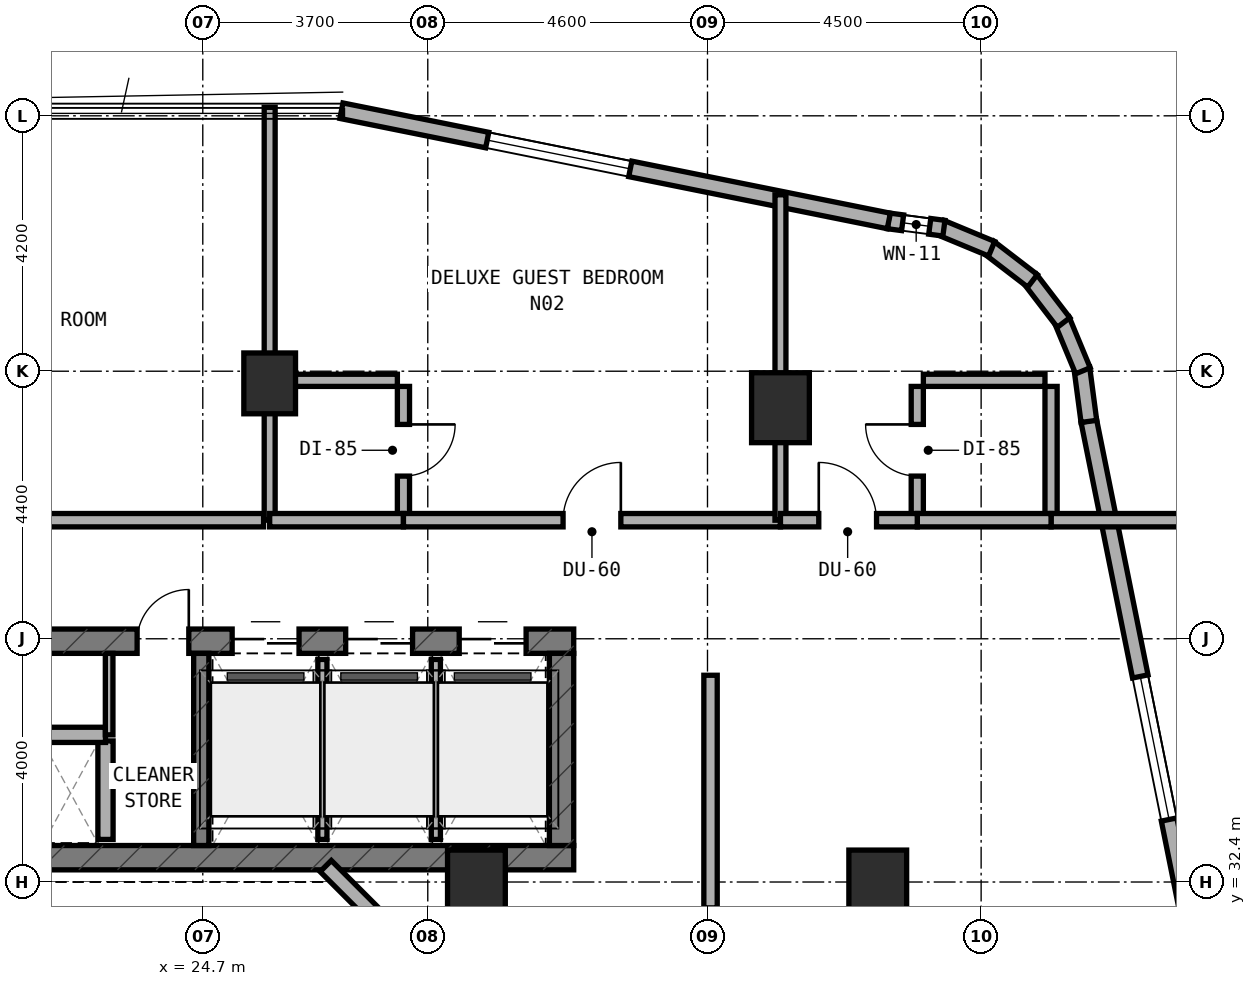
"""IFC4 building model, lengths in metres.
Left out: names, types, materials, properties, quantities, classifications, styles, units other than length and angle.
Written with IfcOpenShell. Run it as: python <this file> out.ifc"""

import sys

from ifc_helpers import new_model, si_unit, direction, frame, frame_2d, origin, origin_2d, place, context, subcontext, project, spatial, rectangle, extrude, element, fill, save


model = new_model("IFC4")
c1 = context("Model", 3, precision=1e-05, world=origin(), true_north=direction((0.0, 1.0)))
c2 = subcontext(c1, "Body", "Model", "MODEL_VIEW")
j1 = project(units=[si_unit("LENGTHUNIT", "METRE"), si_unit("PLANEANGLEUNIT", "RADIAN")], contexts=[c1])
p1 = place(None, origin())
s1 = spatial("IfcSite", under=j1, at=p1, CompositionType="ELEMENT")
p2 = place(p1, origin())
s2 = spatial("IfcBuilding", under=s1, at=p2, CompositionType="ELEMENT")
p3 = place(p2, frame((0.0, 0.0, 127.5)))
s3 = spatial("IfcBuildingStorey", under=s2, at=p3, CompositionType="ELEMENT", Elevation=127.5)
p4 = place(p3, frame((6.4, 32.8, 0.0), z_axis=(0.0, 0.0, 1.0), x_axis=(1.0, 0.0, 0.0)))
e1 = element("IfcWall", 1, at=p4, inside=s3, PredefinedType="SHEAR", context=c2, shape_type="SweptSolid", body=[
    extrude(rectangle(XDim=24.4, YDim=0.4, at=frame_2d((12.2, 0.0))), origin(), (0.0, 0.0, 1.0), 3.5),
])
p5 = place(p4, frame((6.05, 0.0, 0.0)))
e2 = element("IfcOpeningElement", 2, at=p5, cuts=e1, PredefinedType="OPENING", context=c2, shape_type="SweptSolid", body=[
    extrude(rectangle(XDim=1.1, YDim=2.15, at=frame_2d((0.55, 1.075))), frame((0.0, 0.21, 0.0), z_axis=(0.0, -1.0, 0.0), x_axis=(1.0, 0.0, 0.0)), (0.0, 0.0, 1.0), 0.42),
])
p6 = place(p3, frame((6.4, 36.36, 0.0), z_axis=(0.0, 0.0, 1.0), x_axis=(1.0, 0.0, 0.0)))
e3 = element("IfcWall", 3, at=p6, inside=s3, PredefinedType="SHEAR", context=c2, shape_type="SweptSolid", body=[
    extrude(rectangle(XDim=24.4, YDim=0.4, at=frame_2d((12.2, 0.0))), origin(), (0.0, 0.0, 1.0), 3.5),
])
p7 = place(p6, frame((9.15, 0.0, 0.0)))
e4 = element("IfcOpeningElement", 4, at=p7, cuts=e3, PredefinedType="OPENING", context=c2, shape_type="SweptSolid", body=[
    extrude(rectangle(XDim=1.2, YDim=2.15, at=frame_2d((0.6, 1.075))), frame((0.0, 0.21, 0.0), z_axis=(0.0, -1.0, 0.0), x_axis=(1.0, 0.0, 0.0)), (0.0, 0.0, 1.0), 0.42),
])
p8 = place(p6, frame((17.22, 0.0, 0.0)))
e5 = element("IfcOpeningElement", 5, at=p8, cuts=e3, PredefinedType="OPENING", context=c2, shape_type="SweptSolid", body=[
    extrude(rectangle(XDim=0.85, YDim=2.1, at=frame_2d((0.425, 1.05))), frame((0.0, 0.21, 0.0), z_axis=(0.0, -1.0, 0.0), x_axis=(1.0, 0.0, 0.0)), (0.0, 0.0, 1.0), 0.42),
])
p9 = place(p6, frame((18.783, 0.0, 0.0)))
e6 = element("IfcOpeningElement", 6, at=p9, cuts=e3, PredefinedType="OPENING", context=c2, shape_type="SweptSolid", body=[
    extrude(rectangle(XDim=1.1, YDim=2.15, at=frame_2d((0.55, 1.075))), frame((0.0, 0.21, 0.0), z_axis=(0.0, -1.0, 0.0), x_axis=(1.0, 0.0, 0.0)), (0.0, 0.0, 1.0), 0.42),
])
p10 = place(p6, frame((20.65, 0.0, 0.0)))
e7 = element("IfcOpeningElement", 7, at=p10, cuts=e3, PredefinedType="OPENING", context=c2, shape_type="SweptSolid", body=[
    extrude(rectangle(XDim=1.1, YDim=2.15, at=frame_2d((0.55, 1.075))), frame((0.0, 0.21, 0.0), z_axis=(0.0, -1.0, 0.0), x_axis=(1.0, 0.0, 0.0)), (0.0, 0.0, 1.0), 0.42),
])
p11 = place(p6, frame((22.517, 0.0, 0.0)))
e8 = element("IfcOpeningElement", 8, at=p11, cuts=e3, PredefinedType="OPENING", context=c2, shape_type="SweptSolid", body=[
    extrude(rectangle(XDim=1.1, YDim=2.15, at=frame_2d((0.55, 1.075))), frame((0.0, 0.21, 0.0), z_axis=(0.0, -1.0, 0.0), x_axis=(1.0, 0.0, 0.0)), (0.0, 0.0, 1.0), 0.42),
])
p12 = place(p3, frame((30.6, 33.0, 0.0), z_axis=(0.0, 0.0, 1.0), x_axis=(0.0, 1.0, 0.0)))
e9 = element("IfcWall", 9, at=p12, inside=s3, PredefinedType="SHEAR", context=c2, shape_type="SweptSolid", body=[
    extrude(rectangle(XDim=3.16, YDim=0.4, at=frame_2d((1.58, 0.0))), origin(), (0.0, 0.0, 1.0), 3.5),
])
p13 = place(p3, frame((24.675, 33.0, 0.0), z_axis=(0.0, 0.0, 1.0), x_axis=(0.0, 1.0, 0.0)))
e10 = element("IfcWall", 10, at=p13, inside=s3, PredefinedType="STANDARD", context=c2, shape_type="SweptSolid", body=[
    extrude(rectangle(XDim=3.16, YDim=0.25, at=frame_2d((1.58, 0.0))), origin(), (0.0, 0.0, 1.0), 3.22),
])
p14 = place(p3, frame((25.8, 40.6, 0.0), z_axis=(0.0, 0.0, 1.0), x_axis=(1.0, 0.0, 0.0)))
e11 = element("IfcColumn", 11, at=p14, inside=s3, PredefinedType="COLUMN", context=c2, shape_type="SweptSolid", body=[
    extrude(rectangle(XDim=0.85, YDim=1.0, at=origin_2d()), origin(), (0.0, 0.0, 1.0), 3.5),
])
for number, where, z_axis, x_axis in (
    (12, (34.2, 40.2, 0.0), (0.0, 0.0, 1.0), (1.0, 0.0, 0.0)),
    (13, (35.8, 32.35, 0.0), (0.0, 0.0, 1.0), (1.0, 0.0, 0.0)),
    (14, (29.2, 32.35, 0.0), (0.0, 0.0, 1.0), (1.0, 0.0, 0.0)),
):
    element("IfcColumn", number, at=place(p3, frame(where, z_axis=z_axis, x_axis=x_axis)), inside=s3, PredefinedType="COLUMN", context=c2, shape_type="SweptSolid", body=[
        extrude(rectangle(XDim=0.95, YDim=1.15, at=origin_2d()), origin(), (0.0, 0.0, 1.0), 3.5),
    ])
p15 = place(p3, frame((41.084, 30.98, 0.0), z_axis=(0.0, 0.0, 1.0), x_axis=(-0.197435082048, 0.980315963543, 0.0)))
e15 = element("IfcWall", 15, at=p15, inside=s3, PredefinedType="STANDARD", context=c2, shape_type="SweptSolid", body=[
    extrude(rectangle(XDim=9.183, YDim=0.26, at=frame_2d((4.591, 0.0))), origin(), (0.0, 0.0, 1.0), 3.22),
])
p16 = place(p15, frame((2.497, 0.0, 0.8)))
e16 = element("IfcOpeningElement", 16, at=p16, cuts=e15, PredefinedType="OPENING", context=c2, shape_type="SweptSolid", body=[
    extrude(rectangle(XDim=2.4, YDim=1.6, at=frame_2d((1.2, 0.8))), frame((0.0, 0.14, 0.0), z_axis=(0.0, -1.0, 0.0), x_axis=(1.0, 0.0, 0.0)), (0.0, 0.0, 1.0), 0.28),
])
p17 = place(p3, frame((39.272, 39.975, 0.0), z_axis=(0.0, 0.0, 1.0), x_axis=(-0.130953706898, 0.991388484223, 0.0)))
e17 = element("IfcWall", 17, at=p17, inside=s3, PredefinedType="STANDARD", context=c2, shape_type="SweptSolid", body=[
    extrude(rectangle(XDim=0.885, YDim=0.26, at=frame_2d((0.443, 0.0))), origin(), (0.0, 0.0, 1.0), 3.22),
])
p18 = place(p3, frame((39.174, 40.807, 0.0), z_axis=(0.0, 0.0, 1.0), x_axis=(-0.383290660547, 0.923627776508, 0.0)))
e18 = element("IfcWall", 18, at=p18, inside=s3, PredefinedType="STANDARD", context=c2, shape_type="SweptSolid", body=[
    extrude(rectangle(XDim=0.903, YDim=0.26, at=frame_2d((0.452, 0.0))), origin(), (0.0, 0.0, 1.0), 3.22),
])
p19 = place(p3, frame((38.856, 41.601, 0.0), z_axis=(0.0, 0.0, 1.0), x_axis=(-0.608624690463, 0.793458244748, 0.0)))
e19 = element("IfcWall", 19, at=p19, inside=s3, PredefinedType="STANDARD", context=c2, shape_type="SweptSolid", body=[
    extrude(rectangle(XDim=0.902, YDim=0.26, at=frame_2d((0.451, 0.0))), origin(), (0.0, 0.0, 1.0), 3.22),
])
p20 = place(p3, frame((38.345, 42.286, 0.0), z_axis=(0.0, 0.0, 1.0), x_axis=(-0.793558456666, 0.608494022858, 0.0)))
e20 = element("IfcWall", 20, at=p20, inside=s3, PredefinedType="STANDARD", context=c2, shape_type="SweptSolid", body=[
    extrude(rectangle(XDim=0.902, YDim=0.26, at=frame_2d((0.451, 0.0))), origin(), (0.0, 0.0, 1.0), 3.22),
])
p21 = place(p3, frame((37.673, 42.814, 0.0), z_axis=(0.0, 0.0, 1.0), x_axis=(-0.923683767999, 0.383155708213, 0.0)))
e21 = element("IfcWall", 21, at=p21, inside=s3, PredefinedType="STANDARD", context=c2, shape_type="SweptSolid", body=[
    extrude(rectangle(XDim=0.903, YDim=0.26, at=frame_2d((0.451, 0.0))), origin(), (0.0, 0.0, 1.0), 3.22),
])
p22 = place(p3, frame((36.888, 43.152, 0.0), z_axis=(0.0, 0.0, 1.0), x_axis=(-0.991487658083, 0.130200706103, 0.0)))
e22 = element("IfcWall", 22, at=p22, inside=s3, PredefinedType="STANDARD", context=c2, shape_type="SweptSolid", body=[
    extrude(rectangle(XDim=0.921, YDim=0.26, at=frame_2d((0.46, 0.0))), origin(), (0.0, 0.0, 1.0), 3.22),
])
p23 = place(p22, frame((0.235, 0.0, 0.85)))
e23 = element("IfcOpeningElement", 23, at=p23, cuts=e22, PredefinedType="OPENING", context=c2, shape_type="SweptSolid", body=[
    extrude(rectangle(XDim=0.45, YDim=1.5, at=frame_2d((0.225, 0.75))), frame((0.0, 0.14, 0.0), z_axis=(0.0, -1.0, 0.0), x_axis=(1.0, 0.0, 0.0)), (0.0, 0.0, 1.0), 0.28),
])
p24 = place(p3, frame((35.982, 43.271, 0.0), z_axis=(0.0, 0.0, 1.0), x_axis=(-0.980315963543, 0.197435082048, 0.0)))
e24 = element("IfcWall", 24, at=p24, inside=s3, PredefinedType="STANDARD", context=c2, shape_type="SweptSolid", body=[
    extrude(rectangle(XDim=9.183, YDim=0.26, at=frame_2d((4.591, 0.0))), origin(), (0.0, 0.0, 1.0), 3.22),
])
p25 = place(p24, frame((4.337, 0.0, 0.8)))
e25 = element("IfcOpeningElement", 25, at=p25, cuts=e24, PredefinedType="OPENING", context=c2, shape_type="SweptSolid", body=[
    extrude(rectangle(XDim=2.4, YDim=1.6, at=frame_2d((1.2, 0.8))), frame((0.0, 0.14, 0.0), z_axis=(0.0, -1.0, 0.0), x_axis=(1.0, 0.0, 0.0)), (0.0, 0.0, 1.0), 0.28),
])
p26 = place(p3, frame((28.556, 30.828, 0.0), z_axis=(0.0, 0.0, 1.0), x_axis=(-0.707059717605, 0.707153841636, 0.0)))
e26 = element("IfcWall", 26, at=p26, inside=s3, PredefinedType="STANDARD", context=c2, shape_type="SweptSolid", body=[
    extrude(rectangle(XDim=2.594, YDim=0.26, at=frame_2d((1.297, 0.0))), origin(), (0.0, 0.0, 1.0), 3.22),
])
p27 = place(p3, frame((23.1, 33.1, 0.0), z_axis=(0.0, 0.0, 1.0), x_axis=(0.0, 1.0, 0.0)))
e27 = element("IfcWall", 27, at=p27, inside=s3, PredefinedType="SOLIDWALL", context=c2, shape_type="SweptSolid", body=[
    extrude(rectangle(XDim=1.62, YDim=0.25, at=frame_2d((0.81, 0.0))), origin(), (0.0, 0.0, 1.0), 3.22),
])
p28 = place(p3, frame((21.95, 34.82, 0.0), z_axis=(0.0, 0.0, 1.0), x_axis=(1.0, 0.0, 0.0)))
e28 = element("IfcWall", 28, at=p28, inside=s3, PredefinedType="SOLIDWALL", context=c2, shape_type="SweptSolid", body=[
    extrude(rectangle(XDim=1.15, YDim=0.25, at=frame_2d((0.575, 0.0))), origin(), (0.0, 0.0, 1.0), 3.22),
])
p29 = place(p3, frame((23.16, 34.82, 0.0), z_axis=(0.0, 0.0, 1.0), x_axis=(0.0, 1.0, 0.0)))
e29 = element("IfcWall", 29, at=p29, inside=s3, PredefinedType="PARTITIONING", context=c2, shape_type="SweptSolid", body=[
    extrude(rectangle(XDim=1.34, YDim=0.125, at=frame_2d((0.67, 0.0))), origin(), (0.0, 0.0, 1.0), 3.22),
])
p30 = place(p3, frame((26.667, 33.1, 0.0), z_axis=(0.0, 0.0, 1.0), x_axis=(0.0, 1.0, 0.0)))
e30 = element("IfcWall", 30, at=p30, inside=s3, PredefinedType="PARTITIONING", context=c2, shape_type="SweptSolid", body=[
    extrude(rectangle(XDim=2.96, YDim=0.15, at=frame_2d((1.48, 0.0))), origin(), (0.0, 0.0, 1.0), 3.22),
])
p31 = place(p3, frame((28.533, 33.1, 0.0), z_axis=(0.0, 0.0, 1.0), x_axis=(0.0, 1.0, 0.0)))
e31 = element("IfcWall", 31, at=p31, inside=s3, PredefinedType="PARTITIONING", context=c2, shape_type="SweptSolid", body=[
    extrude(rectangle(XDim=2.96, YDim=0.15, at=frame_2d((1.48, 0.0))), origin(), (0.0, 0.0, 1.0), 2.695),
])
p32 = place(p3, frame((7.9, 38.35, 0.0), z_axis=(0.0, 0.0, 1.0), x_axis=(1.0, 0.0, 0.0)))
e32 = element("IfcWall", 32, at=p32, inside=s3, PredefinedType="SOLIDWALL", context=c2, shape_type="SweptSolid", body=[
    extrude(rectangle(XDim=17.8, YDim=0.22, at=frame_2d((8.9, 0.0))), origin(), (0.0, 0.0, 1.0), 2.695),
])
p33 = place(p32, frame((7.573, 0.0, 0.0)))
e33 = element("IfcOpeningElement", 33, at=p33, cuts=e32, PredefinedType="OPENING", context=c2, shape_type="SweptSolid", body=[
    extrude(rectangle(XDim=0.95, YDim=2.1, at=frame_2d((0.475, 1.05))), frame((0.0, 0.12, 0.0), z_axis=(0.0, -1.0, 0.0), x_axis=(1.0, 0.0, 0.0)), (0.0, 0.0, 1.0), 0.24),
])
p34 = place(p3, frame((25.8, 38.35, 0.0), z_axis=(0.0, 0.0, 1.0), x_axis=(0.0, 1.0, 0.0)))
e34 = element("IfcWall", 34, at=p34, inside=s3, PredefinedType="SOLIDWALL", context=c2, shape_type="SweptSolid", body=[
    extrude(rectangle(XDim=6.79, YDim=0.18, at=frame_2d((3.395, 0.0))), origin(), (0.0, 0.0, 1.0), 2.695),
])
p35 = place(p3, frame((28.0, 38.45, 0.0), z_axis=(0.0, 0.0, 1.0), x_axis=(0.0, 1.0, 0.0)))
e35 = element("IfcWall", 35, at=p35, inside=s3, PredefinedType="PLUMBINGWALL", context=c2, shape_type="SweptSolid", body=[
    extrude(rectangle(XDim=2.1, YDim=0.2, at=frame_2d((1.05, 0.0))), origin(), (0.0, 0.0, 1.0), 2.745),
])
p36 = place(p35, frame((0.625, 0.0, 0.0)))
e36 = element("IfcOpeningElement", 36, at=p36, cuts=e35, PredefinedType="OPENING", context=c2, shape_type="SweptSolid", body=[
    extrude(rectangle(XDim=0.85, YDim=2.1, at=frame_2d((0.425, 1.05))), frame((0.0, 0.11, 0.0), z_axis=(0.0, -1.0, 0.0), x_axis=(1.0, 0.0, 0.0)), (0.0, 0.0, 1.0), 0.22),
])
p37 = place(p3, frame((25.9, 40.65, 0.0), z_axis=(0.0, 0.0, 1.0), x_axis=(1.0, 0.0, 0.0)))
e37 = element("IfcWall", 37, at=p37, inside=s3, PredefinedType="PLUMBINGWALL", context=c2, shape_type="SweptSolid", body=[
    extrude(rectangle(XDim=2.0, YDim=0.2, at=frame_2d((1.0, 0.0))), origin(), (0.0, 0.0, 1.0), 2.835),
])
p38 = place(p3, frame((25.8, 38.35, 0.0), z_axis=(0.0, 0.0, 1.0), x_axis=(1.0, 0.0, 0.0)))
e38 = element("IfcWall", 38, at=p38, inside=s3, PredefinedType="SOLIDWALL", context=c2, shape_type="SweptSolid", body=[
    extrude(rectangle(XDim=2.2, YDim=0.22, at=frame_2d((1.1, 0.0))), origin(), (0.0, 0.0, 1.0), 2.695),
])
p39 = place(p3, frame((28.0, 38.35, 0.0), z_axis=(0.0, 0.0, 1.0), x_axis=(1.0, 0.0, 0.0)))
e39 = element("IfcWall", 39, at=p39, inside=s3, PredefinedType="SOLIDWALL", context=c2, shape_type="SweptSolid", body=[
    extrude(rectangle(XDim=6.2, YDim=0.22, at=frame_2d((3.1, 0.0))), origin(), (0.0, 0.0, 1.0), 2.695),
])
p40 = place(p39, frame((2.625, 0.0, 0.0)))
e40 = element("IfcOpeningElement", 40, at=p40, cuts=e39, PredefinedType="OPENING", context=c2, shape_type="SweptSolid", body=[
    extrude(rectangle(XDim=0.95, YDim=2.1, at=frame_2d((0.475, 1.05))), frame((0.0, 0.12, 0.0), z_axis=(0.0, -1.0, 0.0), x_axis=(1.0, 0.0, 0.0)), (0.0, 0.0, 1.0), 0.24),
])
p41 = place(p3, frame((34.2, 38.35, 0.0), z_axis=(0.0, 0.0, 1.0), x_axis=(0.0, 1.0, 0.0)))
e41 = element("IfcWall", 41, at=p41, inside=s3, PredefinedType="SOLIDWALL", context=c2, shape_type="SweptSolid", body=[
    extrude(rectangle(XDim=5.351, YDim=0.18, at=frame_2d((2.675, 0.0))), origin(), (0.0, 0.0, 1.0), 2.695),
])
p42 = place(p3, frame((36.45, 38.45, 0.0), z_axis=(0.0, 0.0, 1.0), x_axis=(0.0, 1.0, 0.0)))
e42 = element("IfcWall", 42, at=p42, inside=s3, PredefinedType="PLUMBINGWALL", context=c2, shape_type="SweptSolid", body=[
    extrude(rectangle(XDim=2.1, YDim=0.2, at=frame_2d((1.05, 0.0))), origin(), (0.0, 0.0, 1.0), 3.22),
])
p43 = place(p42, frame((0.625, 0.0, 0.0)))
e43 = element("IfcOpeningElement", 43, at=p43, cuts=e42, PredefinedType="OPENING", context=c2, shape_type="SweptSolid", body=[
    extrude(rectangle(XDim=0.85, YDim=2.1, at=frame_2d((0.425, 1.05))), frame((0.0, 0.11, 0.0), z_axis=(0.0, -1.0, 0.0), x_axis=(1.0, 0.0, 0.0)), (0.0, 0.0, 1.0), 0.22),
])
p44 = place(p3, frame((36.55, 40.65, 0.0), z_axis=(0.0, 0.0, 1.0), x_axis=(1.0, 0.0, 0.0)))
e44 = element("IfcWall", 44, at=p44, inside=s3, PredefinedType="PLUMBINGWALL", context=c2, shape_type="SweptSolid", body=[
    extrude(rectangle(XDim=2.0, YDim=0.2, at=frame_2d((1.0, 0.0))), origin(), (0.0, 0.0, 1.0), 3.22),
])
p45 = place(p3, frame((38.65, 38.45, 0.0), z_axis=(0.0, 0.0, 1.0), x_axis=(0.0, 1.0, 0.0)))
e45 = element("IfcWall", 45, at=p45, inside=s3, PredefinedType="PLUMBINGWALL", context=c2, shape_type="SweptSolid", body=[
    extrude(rectangle(XDim=2.1, YDim=0.2, at=frame_2d((1.05, 0.0))), origin(), (0.0, 0.0, 1.0), 3.22),
])
p46 = place(p3, frame((38.65, 38.35, 0.0), z_axis=(0.0, 0.0, 1.0), x_axis=(1.0, 0.0, 0.0)))
e46 = element("IfcWall", 46, at=p46, inside=s3, PredefinedType="SOLIDWALL", context=c2, shape_type="SweptSolid", body=[
    extrude(rectangle(XDim=2.39, YDim=0.22, at=frame_2d((1.195, 0.0))), origin(), (0.0, 0.0, 1.0), 3.22),
])
p47 = place(p3, frame((36.45, 38.35, 0.0), z_axis=(0.0, 0.0, 1.0), x_axis=(1.0, 0.0, 0.0)))
e47 = element("IfcWall", 47, at=p47, inside=s3, PredefinedType="SOLIDWALL", context=c2, shape_type="SweptSolid", body=[
    extrude(rectangle(XDim=2.2, YDim=0.22, at=frame_2d((1.1, 0.0))), origin(), (0.0, 0.0, 1.0), 3.22),
])
p48 = place(p3, frame((34.2, 38.35, 0.0), z_axis=(0.0, 0.0, 1.0), x_axis=(1.0, 0.0, 0.0)))
e48 = element("IfcWall", 48, at=p48, inside=s3, PredefinedType="SOLIDWALL", context=c2, shape_type="SweptSolid", body=[
    extrude(rectangle(XDim=2.25, YDim=0.22, at=frame_2d((1.125, 0.0))), origin(), (0.0, 0.0, 1.0), 2.695),
])
p49 = place(p48, frame((0.63, 0.0, 0.0)))
e49 = element("IfcOpeningElement", 49, at=p49, cuts=e48, PredefinedType="OPENING", context=c2, shape_type="SweptSolid", body=[
    extrude(rectangle(XDim=0.95, YDim=2.1, at=frame_2d((0.475, 1.05))), frame((0.0, 0.12, 0.0), z_axis=(0.0, -1.0, 0.0), x_axis=(1.0, 0.0, 0.0)), (0.0, 0.0, 1.0), 0.24),
])
p50 = place(p3, frame((33.05, 27.2, 0.0), z_axis=(0.0, 0.0, 1.0), x_axis=(0.0, 1.0, 0.0)))
e50 = element("IfcWall", 50, at=p50, inside=s3, PredefinedType="SOLIDWALL", context=c2, shape_type="SweptSolid", body=[
    extrude(rectangle(XDim=8.6, YDim=0.22, at=frame_2d((4.3, 0.0))), origin(), (0.0, 0.0, 1.0), 2.695),
])
p51 = place(p50, frame((3.825, 0.0, 0.0)))
e51 = element("IfcOpeningElement", 51, at=p51, cuts=e50, PredefinedType="OPENING", context=c2, shape_type="SweptSolid", body=[
    extrude(rectangle(XDim=0.95, YDim=2.1, at=frame_2d((0.475, 1.05))), frame((0.0, 0.12, 0.0), z_axis=(0.0, -1.0, 0.0), x_axis=(1.0, 0.0, 0.0)), (0.0, 0.0, 1.0), 0.24),
])
p52 = place(p16, origin())
e52 = element("IfcWindow", 52, at=p52, inside=s3, PartitioningType="SINGLE_PANEL", PredefinedType="WINDOW", context=c2, shape_type="SweptSolid", body=[
    extrude(rectangle(XDim=2.4, YDim=1.6, at=frame_2d((1.2, 0.8))), frame((0.0, 0.03, 0.0), z_axis=(0.0, -1.0, 0.0), x_axis=(1.0, 0.0, 0.0)), (0.0, 0.0, 1.0), 0.06),
])
fill(e16, e52)
p53 = place(p25, origin())
e53 = element("IfcWindow", 53, at=p53, inside=s3, PartitioningType="SINGLE_PANEL", PredefinedType="WINDOW", context=c2, shape_type="SweptSolid", body=[
    extrude(rectangle(XDim=2.4, YDim=1.6, at=frame_2d((1.2, 0.8))), frame((0.0, 0.03, 0.0), z_axis=(0.0, -1.0, 0.0), x_axis=(1.0, 0.0, 0.0)), (0.0, 0.0, 1.0), 0.06),
])
fill(e25, e53)
p54 = place(p23, origin())
e54 = element("IfcWindow", 54, at=p54, inside=s3, PartitioningType="SINGLE_PANEL", PredefinedType="WINDOW", context=c2, shape_type="SweptSolid", body=[
    extrude(rectangle(XDim=0.45, YDim=1.5, at=frame_2d((0.225, 0.75))), frame((0.0, 0.03, 0.0), z_axis=(0.0, -1.0, 0.0), x_axis=(1.0, 0.0, 0.0)), (0.0, 0.0, 1.0), 0.06),
])
fill(e23, e54)
p55 = place(p8, origin())
e55 = element("IfcDoor", 55, at=p55, inside=s3, OperationType="SINGLE_SWING_RIGHT", PredefinedType="DOOR", context=c2, shape_type="SweptSolid", body=[
    extrude(rectangle(XDim=0.85, YDim=2.1, at=frame_2d((0.425, 1.05))), frame((0.0, 0.025, 0.0), z_axis=(0.0, -1.0, 0.0), x_axis=(1.0, 0.0, 0.0)), (0.0, 0.0, 1.0), 0.05),
])
fill(e5, e55)
p56 = place(p9, origin())
e56 = element("IfcDoor", 56, at=p56, inside=s3, OperationType="DOUBLE_DOOR_SLIDING", PredefinedType="DOOR", context=c2, shape_type="SweptSolid", body=[
    extrude(rectangle(XDim=1.1, YDim=2.15, at=frame_2d((0.55, 1.075))), frame((0.0, 0.025, 0.0), z_axis=(0.0, -1.0, 0.0), x_axis=(1.0, 0.0, 0.0)), (0.0, 0.0, 1.0), 0.05),
])
fill(e6, e56)
p57 = place(p10, origin())
e57 = element("IfcDoor", 57, at=p57, inside=s3, OperationType="DOUBLE_DOOR_SLIDING", PredefinedType="DOOR", context=c2, shape_type="SweptSolid", body=[
    extrude(rectangle(XDim=1.1, YDim=2.15, at=frame_2d((0.55, 1.075))), frame((0.0, 0.025, 0.0), z_axis=(0.0, -1.0, 0.0), x_axis=(1.0, 0.0, 0.0)), (0.0, 0.0, 1.0), 0.05),
])
fill(e7, e57)
p58 = place(p11, origin())
e58 = element("IfcDoor", 58, at=p58, inside=s3, OperationType="DOUBLE_DOOR_SLIDING", PredefinedType="DOOR", context=c2, shape_type="SweptSolid", body=[
    extrude(rectangle(XDim=1.1, YDim=2.15, at=frame_2d((0.55, 1.075))), frame((0.0, 0.025, 0.0), z_axis=(0.0, -1.0, 0.0), x_axis=(1.0, 0.0, 0.0)), (0.0, 0.0, 1.0), 0.05),
])
fill(e8, e58)
p59 = place(p36, frame((0.85, 0.0, 0.0), z_axis=(0.0, 0.0, 1.0), x_axis=(-1.0, 0.0, 0.0)))
e59 = element("IfcDoor", 59, at=p59, inside=s3, OperationType="SINGLE_SWING_LEFT", PredefinedType="DOOR", context=c2, shape_type="SweptSolid", body=[
    extrude(rectangle(XDim=0.85, YDim=2.1, at=frame_2d((0.425, 1.05))), frame((0.0, 0.025, 0.0), z_axis=(0.0, -1.0, 0.0), x_axis=(1.0, 0.0, 0.0)), (0.0, 0.0, 1.0), 0.05),
])
fill(e36, e59)
p60 = place(p40, origin())
e60 = element("IfcDoor", 60, at=p60, inside=s3, OperationType="SINGLE_SWING_RIGHT", PredefinedType="DOOR", context=c2, shape_type="SweptSolid", body=[
    extrude(rectangle(XDim=0.95, YDim=2.1, at=frame_2d((0.475, 1.05))), frame((0.0, 0.025, 0.0), z_axis=(0.0, -1.0, 0.0), x_axis=(1.0, 0.0, 0.0)), (0.0, 0.0, 1.0), 0.05),
])
fill(e40, e60)
p61 = place(p43, origin())
e61 = element("IfcDoor", 61, at=p61, inside=s3, OperationType="SINGLE_SWING_RIGHT", PredefinedType="DOOR", context=c2, shape_type="SweptSolid", body=[
    extrude(rectangle(XDim=0.85, YDim=2.1, at=frame_2d((0.425, 1.05))), frame((0.0, 0.025, 0.0), z_axis=(0.0, -1.0, 0.0), x_axis=(1.0, 0.0, 0.0)), (0.0, 0.0, 1.0), 0.05),
])
fill(e43, e61)
p62 = place(p49, origin())
e62 = element("IfcDoor", 62, at=p62, inside=s3, OperationType="SINGLE_SWING_LEFT", PredefinedType="DOOR", context=c2, shape_type="SweptSolid", body=[
    extrude(rectangle(XDim=0.95, YDim=2.1, at=frame_2d((0.475, 1.05))), frame((0.0, 0.025, 0.0), z_axis=(0.0, -1.0, 0.0), x_axis=(1.0, 0.0, 0.0)), (0.0, 0.0, 1.0), 0.05),
])
fill(e49, e62)
save(model, sys.argv[1])
